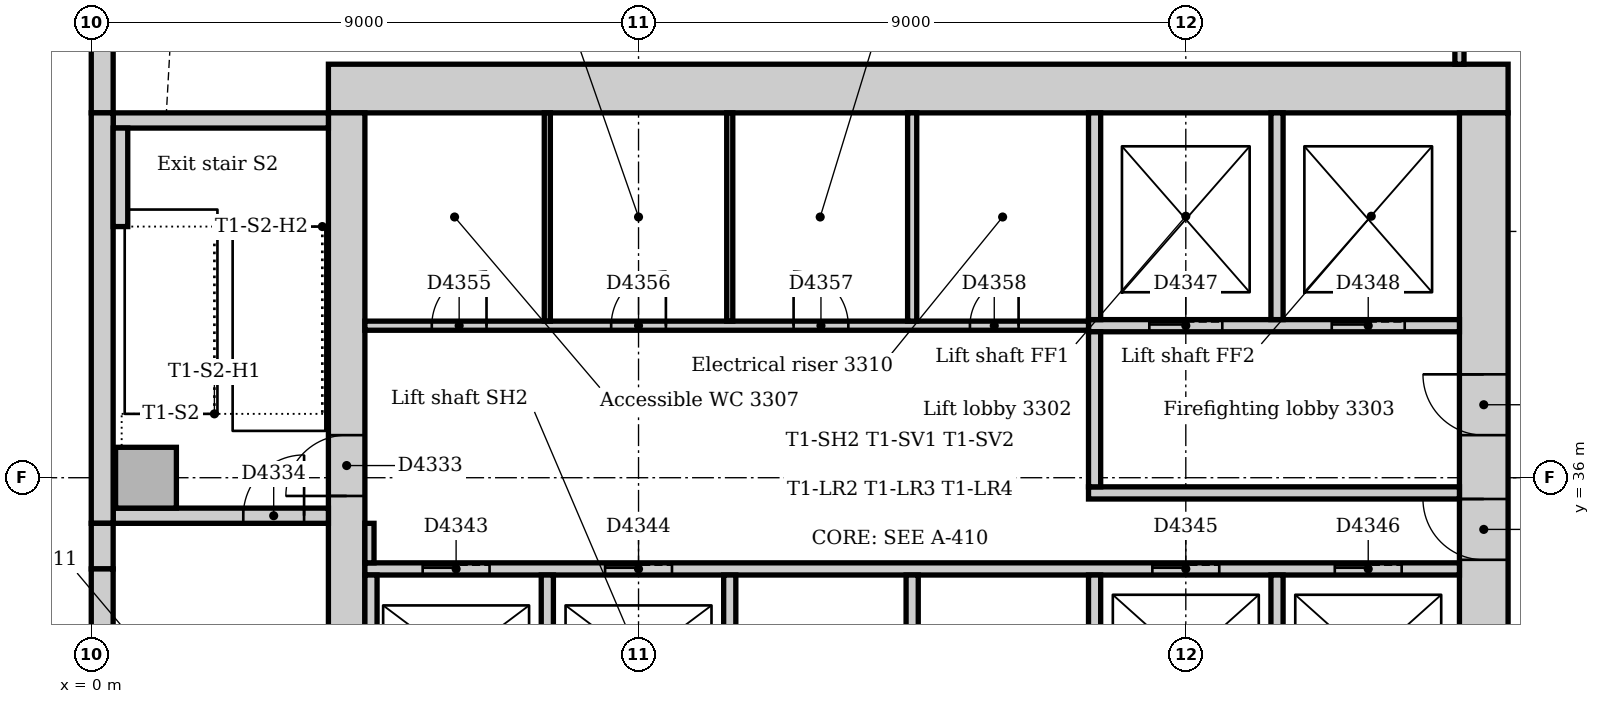
"""IFC4 building model, lengths in metres.
Left out: names, types, materials, properties, quantities, classifications, styles, units other than length and angle.
Written with IfcOpenShell. Run it as: python <this file> out.ifc"""

import sys

from ifc_helpers import new_model, si_unit, direction, frame, frame_2d, origin, origin_2d, place, context, subcontext, project, spatial, rectangle, extrude, element, fill, save


model = new_model("IFC4")
c1 = context("Model", 3, precision=1e-05, world=origin(), true_north=direction((0.0, 1.0)))
c2 = subcontext(c1, "Body", "Model", "MODEL_VIEW")
j1 = project(units=[si_unit("LENGTHUNIT", "METRE"), si_unit("PLANEANGLEUNIT", "RADIAN")], contexts=[c1])
p1 = place(None, origin())
s1 = spatial("IfcSite", under=j1, at=p1, CompositionType="ELEMENT")
p2 = place(p1, origin())
s2 = spatial("IfcBuilding", under=s1, at=p2, CompositionType="ELEMENT")
p3 = place(p2, frame((0.0, 0.0, 140.0)))
s3 = spatial("IfcBuildingStorey", under=s2, at=p3, CompositionType="ELEMENT", Elevation=140.0)
p4 = place(p3, frame((23.3, 42.4, 0.0), z_axis=(0.0, 0.0, 1.0), x_axis=(-1.0, 0.0, 0.0)))
e1 = element("IfcWall", 1, at=p4, inside=s3, PredefinedType="SOLIDWALL", context=c2, shape_type="SweptSolid", body=[
    extrude(rectangle(XDim=19.4, YDim=0.8, at=frame_2d((9.7, 0.0))), origin(), (0.0, 0.0, 1.0), 4.0),
])
p5 = place(p3, frame((22.9, 31.5, 0.0), z_axis=(0.0, 0.0, 1.0), x_axis=(0.0, 1.0, 0.0)))
e2 = element("IfcWall", 2, at=p5, inside=s3, PredefinedType="SOLIDWALL", context=c2, shape_type="SweptSolid", body=[
    extrude(rectangle(XDim=10.5, YDim=0.8, at=frame_2d((5.25, 0.0))), origin(), (0.0, 0.0, 1.0), 4.0),
])
p6 = place(p5, frame((3.15, 0.0, 0.0)))
e3 = element("IfcOpeningElement", 3, at=p6, cuts=e2, PredefinedType="OPENING", context=c2, shape_type="SweptSolid", body=[
    extrude(rectangle(XDim=1.0, YDim=2.1, at=frame_2d((0.5, 1.05))), frame((0.0, 0.41, 0.0), z_axis=(0.0, -1.0, 0.0), x_axis=(1.0, 0.0, 0.0)), (0.0, 0.0, 1.0), 0.82),
])
p7 = place(p5, frame((5.2, 0.0, 0.0)))
e4 = element("IfcOpeningElement", 4, at=p7, cuts=e2, PredefinedType="OPENING", context=c2, shape_type="SweptSolid", body=[
    extrude(rectangle(XDim=1.0, YDim=2.1, at=frame_2d((0.5, 1.05))), frame((0.0, 0.41, 0.0), z_axis=(0.0, -1.0, 0.0), x_axis=(1.0, 0.0, 0.0)), (0.0, 0.0, 1.0), 0.82),
])
p8 = place(p3, frame((4.2, 42.0, 0.0), z_axis=(0.0, 0.0, 1.0), x_axis=(0.0, -1.0, 0.0)))
e5 = element("IfcWall", 5, at=p8, inside=s3, PredefinedType="SOLIDWALL", context=c2, shape_type="SweptSolid", body=[
    extrude(rectangle(XDim=10.5, YDim=0.6, at=frame_2d((5.25, 0.0))), origin(), (0.0, 0.0, 1.0), 4.0),
])
p9 = place(p8, frame((5.3, 0.0, 0.0)))
e6 = element("IfcOpeningElement", 6, at=p9, cuts=e5, PredefinedType="OPENING", context=c2, shape_type="SweptSolid", body=[
    extrude(rectangle(XDim=1.0, YDim=2.1, at=frame_2d((0.5, 1.05))), frame((0.0, 0.31, 0.0), z_axis=(0.0, -1.0, 0.0), x_axis=(1.0, 0.0, 0.0)), (0.0, 0.0, 1.0), 0.62),
])
p10 = place(p3, frame((0.36, 35.375, 0.0), z_axis=(0.0, 0.0, 1.0), x_axis=(1.0, 0.0, 0.0)))
e7 = element("IfcWall", 7, at=p10, inside=s3, PredefinedType="SOLIDWALL", context=c2, shape_type="SweptSolid", body=[
    extrude(rectangle(XDim=3.54, YDim=0.25, at=frame_2d((1.77, 0.0))), origin(), (0.0, 0.0, 1.0), 4.0),
])
p11 = place(p10, frame((2.14, 0.0, 0.0)))
e8 = element("IfcOpeningElement", 8, at=p11, cuts=e7, PredefinedType="OPENING", context=c2, shape_type="SweptSolid", body=[
    extrude(rectangle(XDim=1.0, YDim=2.1, at=frame_2d((0.5, 1.05))), frame((0.0, 0.135, 0.0), z_axis=(0.0, -1.0, 0.0), x_axis=(1.0, 0.0, 0.0)), (0.0, 0.0, 1.0), 0.27),
])
p12 = place(p3, frame((3.9, 41.875, 0.0), z_axis=(0.0, 0.0, 1.0), x_axis=(-1.0, 0.0, 0.0)))
e9 = element("IfcWall", 9, at=p12, inside=s3, PredefinedType="SOLIDWALL", context=c2, shape_type="SweptSolid", body=[
    extrude(rectangle(XDim=3.54, YDim=0.25, at=frame_2d((1.77, 0.0))), origin(), (0.0, 0.0, 1.0), 4.0),
])
p13 = place(p3, frame((0.9, 36.0, 0.0), z_axis=(0.0, 0.0, 1.0), x_axis=(1.0, 0.0, 0.0)))
e10 = element("IfcColumn", 10, at=p13, inside=s3, PredefinedType="COLUMN", context=c2, shape_type="SweptSolid", body=[
    extrude(rectangle(XDim=1.0, YDim=1.0, at=origin_2d()), origin(), (0.0, 0.0, 1.0), 4.0),
])
p14 = place(p3, frame((0.18, 45.257, 0.0), z_axis=(0.0, 0.0, 1.0), x_axis=(0.0, -1.0, 0.0)))
e11 = element("IfcWall", 11, at=p14, inside=s3, PredefinedType="STANDARD", context=c2, shape_type="SweptSolid", body=[
    extrude(rectangle(XDim=3.257, YDim=0.36, at=frame_2d((1.629, 0.0))), origin(), (0.0, 0.0, 1.0), 3.7),
])
p15 = place(p3, frame((0.18, 42.0, 0.0), z_axis=(0.0, 0.0, 1.0), x_axis=(0.0, -1.0, 0.0)))
e12 = element("IfcWall", 12, at=p15, inside=s3, PredefinedType="STANDARD", context=c2, shape_type="SweptSolid", body=[
    extrude(rectangle(XDim=6.75, YDim=0.36, at=frame_2d((3.375, 0.0))), origin(), (0.0, 0.0, 1.0), 3.7),
])
p16 = place(p3, frame((0.18, 35.25, 0.0), z_axis=(0.0, 0.0, 1.0), x_axis=(0.0, -1.0, 0.0)))
e13 = element("IfcWall", 13, at=p16, inside=s3, PredefinedType="STANDARD", context=c2, shape_type="SweptSolid", body=[
    extrude(rectangle(XDim=0.75, YDim=0.36, at=frame_2d((0.375, 0.0))), origin(), (0.0, 0.0, 1.0), 3.7),
])
p17 = place(p3, frame((0.18, 34.5, 0.0), z_axis=(0.0, 0.0, 1.0), x_axis=(0.0, -1.0, 0.0)))
e14 = element("IfcWall", 14, at=p17, inside=s3, PredefinedType="STANDARD", context=c2, shape_type="SweptSolid", body=[
    extrude(rectangle(XDim=6.0, YDim=0.36, at=frame_2d((3.0, 0.0))), origin(), (0.0, 0.0, 1.0), 3.7),
])
p18 = place(p17, frame((2.1, 0.0, 0.0)))
e15 = element("IfcOpeningElement", 15, at=p18, cuts=e14, PredefinedType="OPENING", context=c2, shape_type="SweptSolid", body=[
    extrude(rectangle(XDim=1.8, YDim=2.4, at=frame_2d((0.9, 1.2))), frame((0.0, 0.19, 0.0), z_axis=(0.0, -1.0, 0.0), x_axis=(1.0, 0.0, 0.0)), (0.0, 0.0, 1.0), 0.38),
])
p19 = place(p3, frame((0.48, 40.13, 0.0), z_axis=(0.0, 0.0, 1.0), x_axis=(0.0, 1.0, 0.0)))
e16 = element("IfcWall", 16, at=p19, inside=s3, PredefinedType="STANDARD", context=c2, shape_type="SweptSolid", body=[
    extrude(rectangle(XDim=1.62, YDim=0.24, at=frame_2d((0.81, 0.0))), origin(), (0.0, 0.0, 1.0), 4.0),
])
p20 = place(p3, frame((16.4, 35.75, 0.0), z_axis=(0.0, 0.0, 1.0), x_axis=(1.0, 0.0, 0.0)))
e17 = element("IfcWall", 17, at=p20, inside=s3, PredefinedType="PARTITIONING", context=c2, shape_type="SweptSolid", body=[
    extrude(rectangle(XDim=6.1, YDim=0.2, at=frame_2d((3.05, 0.0))), origin(), (0.0, 0.0, 1.0), 3.7),
])
p21 = place(p3, frame((16.4, 38.5, 0.0), z_axis=(0.0, 0.0, 1.0), x_axis=(1.0, 0.0, 0.0)))
e18 = element("IfcWall", 18, at=p21, inside=s3, PredefinedType="PARTITIONING", context=c2, shape_type="SweptSolid", body=[
    extrude(rectangle(XDim=6.1, YDim=0.2, at=frame_2d((3.05, 0.0))), origin(), (0.0, 0.0, 1.0), 3.7),
])
p22 = place(p21, frame((1.0, 0.0, 0.0)))
e19 = element("IfcOpeningElement", 19, at=p22, cuts=e18, PredefinedType="OPENING", context=c2, shape_type="SweptSolid", body=[
    extrude(rectangle(XDim=1.2, YDim=2.1, at=frame_2d((0.6, 1.05))), frame((0.0, 0.11, 0.0), z_axis=(0.0, -1.0, 0.0), x_axis=(1.0, 0.0, 0.0)), (0.0, 0.0, 1.0), 0.22),
])
p23 = place(p21, frame((4.0, 0.0, 0.0)))
e20 = element("IfcOpeningElement", 20, at=p23, cuts=e18, PredefinedType="OPENING", context=c2, shape_type="SweptSolid", body=[
    extrude(rectangle(XDim=1.2, YDim=2.1, at=frame_2d((0.6, 1.05))), frame((0.0, 0.11, 0.0), z_axis=(0.0, -1.0, 0.0), x_axis=(1.0, 0.0, 0.0)), (0.0, 0.0, 1.0), 0.22),
])
p24 = place(p3, frame((16.5, 35.85, 0.0), z_axis=(0.0, 0.0, 1.0), x_axis=(0.0, 1.0, 0.0)))
e21 = element("IfcWall", 21, at=p24, inside=s3, PredefinedType="PARTITIONING", context=c2, shape_type="SweptSolid", body=[
    extrude(rectangle(XDim=2.55, YDim=0.2, at=frame_2d((1.275, 0.0))), origin(), (0.0, 0.0, 1.0), 3.7),
])
p25 = place(p3, frame((4.5, 34.5, 0.0), z_axis=(0.0, 0.0, 1.0), x_axis=(1.0, 0.0, 0.0)))
e22 = element("IfcWall", 22, at=p25, inside=s3, PredefinedType="PARTITIONING", context=c2, shape_type="SweptSolid", body=[
    extrude(rectangle(XDim=18.0, YDim=0.2, at=frame_2d((9.0, 0.0))), origin(), (0.0, 0.0, 1.0), 3.7),
])
p26 = place(p25, frame((0.95, 0.0, 0.0)))
e23 = element("IfcOpeningElement", 23, at=p26, cuts=e22, PredefinedType="OPENING", context=c2, shape_type="SweptSolid", body=[
    extrude(rectangle(XDim=1.1, YDim=2.1, at=frame_2d((0.55, 1.05))), frame((0.0, 0.11, 0.0), z_axis=(0.0, -1.0, 0.0), x_axis=(1.0, 0.0, 0.0)), (0.0, 0.0, 1.0), 0.22),
])
p27 = place(p25, frame((3.95, 0.0, 0.0)))
e24 = element("IfcOpeningElement", 24, at=p27, cuts=e22, PredefinedType="OPENING", context=c2, shape_type="SweptSolid", body=[
    extrude(rectangle(XDim=1.1, YDim=2.1, at=frame_2d((0.55, 1.05))), frame((0.0, 0.11, 0.0), z_axis=(0.0, -1.0, 0.0), x_axis=(1.0, 0.0, 0.0)), (0.0, 0.0, 1.0), 0.22),
])
p28 = place(p25, frame((12.95, 0.0, 0.0)))
e25 = element("IfcOpeningElement", 25, at=p28, cuts=e22, PredefinedType="OPENING", context=c2, shape_type="SweptSolid", body=[
    extrude(rectangle(XDim=1.1, YDim=2.1, at=frame_2d((0.55, 1.05))), frame((0.0, 0.11, 0.0), z_axis=(0.0, -1.0, 0.0), x_axis=(1.0, 0.0, 0.0)), (0.0, 0.0, 1.0), 0.22),
])
p29 = place(p25, frame((15.95, 0.0, 0.0)))
e26 = element("IfcOpeningElement", 26, at=p29, cuts=e22, PredefinedType="OPENING", context=c2, shape_type="SweptSolid", body=[
    extrude(rectangle(XDim=1.1, YDim=2.1, at=frame_2d((0.55, 1.05))), frame((0.0, 0.11, 0.0), z_axis=(0.0, -1.0, 0.0), x_axis=(1.0, 0.0, 0.0)), (0.0, 0.0, 1.0), 0.22),
])
for number, where, z_axis, x_axis in (
    (27, (16.5, 38.6, 0.0), (0.0, 0.0, 1.0), (0.0, 1.0, 0.0)),
    (28, (19.5, 38.6, 0.0), (0.0, 0.0, 1.0), (0.0, 1.0, 0.0)),
):
    element("IfcWall", number, at=place(p3, frame(where, z_axis=z_axis, x_axis=x_axis)), inside=s3, PredefinedType="PARTITIONING", context=c2, shape_type="SweptSolid", body=[
        extrude(rectangle(XDim=3.4, YDim=0.2, at=frame_2d((1.7, 0.0))), origin(), (0.0, 0.0, 1.0), 3.7),
    ])
for number, where, z_axis, x_axis in (
    (29, (4.6, 31.75, 0.0), (0.0, 0.0, 1.0), (0.0, 1.0, 0.0)),
    (30, (7.5, 31.75, 0.0), (0.0, 0.0, 1.0), (0.0, 1.0, 0.0)),
    (31, (10.5, 31.75, 0.0), (0.0, 0.0, 1.0), (0.0, 1.0, 0.0)),
    (32, (13.5, 31.75, 0.0), (0.0, 0.0, 1.0), (0.0, 1.0, 0.0)),
    (33, (16.5, 31.75, 0.0), (0.0, 0.0, 1.0), (0.0, 1.0, 0.0)),
    (34, (19.5, 31.75, 0.0), (0.0, 0.0, 1.0), (0.0, 1.0, 0.0)),
):
    element("IfcWall", number, at=place(p3, frame(where, z_axis=z_axis, x_axis=x_axis)), inside=s3, PredefinedType="PARTITIONING", context=c2, shape_type="SweptSolid", body=[
        extrude(rectangle(XDim=2.65, YDim=0.2, at=frame_2d((1.325, 0.0))), origin(), (0.0, 0.0, 1.0), 3.7),
    ])
p30 = place(p3, frame((4.5, 38.5, 0.0), z_axis=(0.0, 0.0, 1.0), x_axis=(1.0, 0.0, 0.0)))
e35 = element("IfcWall", 35, at=p30, inside=s3, PredefinedType="PARTITIONING", context=c2, shape_type="SweptSolid", body=[
    extrude(rectangle(XDim=11.9, YDim=0.15, at=frame_2d((5.95, 0.0))), origin(), (0.0, 0.0, 1.0), 3.7),
])
p31 = place(p30, frame((1.1, 0.0, 0.0)))
e36 = element("IfcOpeningElement", 36, at=p31, cuts=e35, PredefinedType="OPENING", context=c2, shape_type="SweptSolid", body=[
    extrude(rectangle(XDim=0.9, YDim=2.1, at=frame_2d((0.45, 1.05))), frame((0.0, 0.085, 0.0), z_axis=(0.0, -1.0, 0.0), x_axis=(1.0, 0.0, 0.0)), (0.0, 0.0, 1.0), 0.17),
])
p32 = place(p30, frame((4.05, 0.0, 0.0)))
e37 = element("IfcOpeningElement", 37, at=p32, cuts=e35, PredefinedType="OPENING", context=c2, shape_type="SweptSolid", body=[
    extrude(rectangle(XDim=0.9, YDim=2.1, at=frame_2d((0.45, 1.05))), frame((0.0, 0.085, 0.0), z_axis=(0.0, -1.0, 0.0), x_axis=(1.0, 0.0, 0.0)), (0.0, 0.0, 1.0), 0.17),
])
p33 = place(p30, frame((7.05, 0.0, 0.0)))
e38 = element("IfcOpeningElement", 38, at=p33, cuts=e35, PredefinedType="OPENING", context=c2, shape_type="SweptSolid", body=[
    extrude(rectangle(XDim=0.9, YDim=2.1, at=frame_2d((0.45, 1.05))), frame((0.0, 0.085, 0.0), z_axis=(0.0, -1.0, 0.0), x_axis=(1.0, 0.0, 0.0)), (0.0, 0.0, 1.0), 0.17),
])
p34 = place(p30, frame((9.95, 0.0, 0.0)))
e39 = element("IfcOpeningElement", 39, at=p34, cuts=e35, PredefinedType="OPENING", context=c2, shape_type="SweptSolid", body=[
    extrude(rectangle(XDim=0.8, YDim=2.1, at=frame_2d((0.4, 1.05))), frame((0.0, 0.085, 0.0), z_axis=(0.0, -1.0, 0.0), x_axis=(1.0, 0.0, 0.0)), (0.0, 0.0, 1.0), 0.17),
])
p35 = place(p3, frame((22.5, 42.8, 0.0), z_axis=(0.0, 0.0, 1.0), x_axis=(0.0, 1.0, 0.0)))
e40 = element("IfcWall", 40, at=p35, inside=s3, PredefinedType="PARTITIONING", context=c2, shape_type="SweptSolid", body=[
    extrude(rectangle(XDim=1.725, YDim=0.15, at=frame_2d((0.863, 0.0))), origin(), (0.0, 0.0, 1.0), 3.7),
])
p36 = place(p3, frame((4.575, 34.6, 0.0), z_axis=(0.0, 0.0, 1.0), x_axis=(0.0, 1.0, 0.0)))
e41 = element("IfcWall", 41, at=p36, inside=s3, PredefinedType="PARTITIONING", context=c2, shape_type="SweptSolid", body=[
    extrude(rectangle(XDim=0.65, YDim=0.15, at=frame_2d((0.325, 0.0))), origin(), (0.0, 0.0, 1.0), 3.7),
])
p37 = place(p3, frame((13.5, 38.575, 0.0), z_axis=(0.0, 0.0, 1.0), x_axis=(0.0, 1.0, 0.0)))
e42 = element("IfcWall", 42, at=p37, inside=s3, PredefinedType="PARTITIONING", context=c2, shape_type="SweptSolid", body=[
    extrude(rectangle(XDim=3.425, YDim=0.15, at=frame_2d((1.712, 0.0))), origin(), (0.0, 0.0, 1.0), 3.7),
])
for number, where, z_axis, x_axis in (
    (43, (7.5, 38.575, 0.0), (0.0, 0.0, 1.0), (0.0, 1.0, 0.0)),
    (44, (10.5, 38.575, 0.0), (0.0, 0.0, 1.0), (0.0, 1.0, 0.0)),
):
    element("IfcWall", number, at=place(p3, frame(where, z_axis=z_axis, x_axis=x_axis)), inside=s3, PredefinedType="PARTITIONING", context=c2, shape_type="SweptSolid", body=[
        extrude(rectangle(XDim=3.425, YDim=0.1, at=frame_2d((1.712, 0.0))), origin(), (0.0, 0.0, 1.0), 3.7),
    ])
p38 = place(p9, frame((1.0, 0.0, 0.0), z_axis=(0.0, 0.0, 1.0), x_axis=(-1.0, 0.0, 0.0)))
e45 = element("IfcDoor", 45, at=p38, inside=s3, OperationType="SINGLE_SWING_LEFT", PredefinedType="DOOR", context=c2, shape_type="SweptSolid", body=[
    extrude(rectangle(XDim=1.0, YDim=2.1, at=frame_2d((0.5, 1.05))), frame((0.0, 0.025, 0.0), z_axis=(0.0, -1.0, 0.0), x_axis=(1.0, 0.0, 0.0)), (0.0, 0.0, 1.0), 0.05),
])
fill(e6, e45)
p39 = place(p11, origin())
e46 = element("IfcDoor", 46, at=p39, inside=s3, OperationType="SINGLE_SWING_RIGHT", PredefinedType="DOOR", context=c2, shape_type="SweptSolid", body=[
    extrude(rectangle(XDim=1.0, YDim=2.1, at=frame_2d((0.5, 1.05))), frame((0.0, 0.025, 0.0), z_axis=(0.0, -1.0, 0.0), x_axis=(1.0, 0.0, 0.0)), (0.0, 0.0, 1.0), 0.05),
])
fill(e8, e46)
p40 = place(p26, origin())
e47 = element("IfcDoor", 47, at=p40, inside=s3, OperationType="SLIDING_TO_LEFT", PredefinedType="DOOR", context=c2, shape_type="SweptSolid", body=[
    extrude(rectangle(XDim=1.1, YDim=2.1, at=frame_2d((0.55, 1.05))), frame((0.0, 0.025, 0.0), z_axis=(0.0, -1.0, 0.0), x_axis=(1.0, 0.0, 0.0)), (0.0, 0.0, 1.0), 0.05),
])
fill(e23, e47)
p41 = place(p27, origin())
e48 = element("IfcDoor", 48, at=p41, inside=s3, OperationType="SLIDING_TO_LEFT", PredefinedType="DOOR", context=c2, shape_type="SweptSolid", body=[
    extrude(rectangle(XDim=1.1, YDim=2.1, at=frame_2d((0.55, 1.05))), frame((0.0, 0.025, 0.0), z_axis=(0.0, -1.0, 0.0), x_axis=(1.0, 0.0, 0.0)), (0.0, 0.0, 1.0), 0.05),
])
fill(e24, e48)
p42 = place(p28, origin())
e49 = element("IfcDoor", 49, at=p42, inside=s3, OperationType="SLIDING_TO_LEFT", PredefinedType="DOOR", context=c2, shape_type="SweptSolid", body=[
    extrude(rectangle(XDim=1.1, YDim=2.1, at=frame_2d((0.55, 1.05))), frame((0.0, 0.025, 0.0), z_axis=(0.0, -1.0, 0.0), x_axis=(1.0, 0.0, 0.0)), (0.0, 0.0, 1.0), 0.05),
])
fill(e25, e49)
p43 = place(p29, origin())
e50 = element("IfcDoor", 50, at=p43, inside=s3, OperationType="SLIDING_TO_LEFT", PredefinedType="DOOR", context=c2, shape_type="SweptSolid", body=[
    extrude(rectangle(XDim=1.1, YDim=2.1, at=frame_2d((0.55, 1.05))), frame((0.0, 0.025, 0.0), z_axis=(0.0, -1.0, 0.0), x_axis=(1.0, 0.0, 0.0)), (0.0, 0.0, 1.0), 0.05),
])
fill(e26, e50)
p44 = place(p22, origin())
e51 = element("IfcDoor", 51, at=p44, inside=s3, OperationType="SLIDING_TO_LEFT", PredefinedType="DOOR", context=c2, shape_type="SweptSolid", body=[
    extrude(rectangle(XDim=1.2, YDim=2.1, at=frame_2d((0.6, 1.05))), frame((0.0, 0.025, 0.0), z_axis=(0.0, -1.0, 0.0), x_axis=(1.0, 0.0, 0.0)), (0.0, 0.0, 1.0), 0.05),
])
fill(e19, e51)
p45 = place(p23, origin())
e52 = element("IfcDoor", 52, at=p45, inside=s3, OperationType="SLIDING_TO_LEFT", PredefinedType="DOOR", context=c2, shape_type="SweptSolid", body=[
    extrude(rectangle(XDim=1.2, YDim=2.1, at=frame_2d((0.6, 1.05))), frame((0.0, 0.025, 0.0), z_axis=(0.0, -1.0, 0.0), x_axis=(1.0, 0.0, 0.0)), (0.0, 0.0, 1.0), 0.05),
])
fill(e20, e52)
p46 = place(p6, origin())
e53 = element("IfcDoor", 53, at=p46, inside=s3, OperationType="SINGLE_SWING_RIGHT", PredefinedType="DOOR", context=c2, shape_type="SweptSolid", body=[
    extrude(rectangle(XDim=1.0, YDim=2.1, at=frame_2d((0.5, 1.05))), frame((0.0, 0.025, 0.0), z_axis=(0.0, -1.0, 0.0), x_axis=(1.0, 0.0, 0.0)), (0.0, 0.0, 1.0), 0.05),
])
fill(e3, e53)
p47 = place(p7, origin())
e54 = element("IfcDoor", 54, at=p47, inside=s3, OperationType="SINGLE_SWING_RIGHT", PredefinedType="DOOR", context=c2, shape_type="SweptSolid", body=[
    extrude(rectangle(XDim=1.0, YDim=2.1, at=frame_2d((0.5, 1.05))), frame((0.0, 0.025, 0.0), z_axis=(0.0, -1.0, 0.0), x_axis=(1.0, 0.0, 0.0)), (0.0, 0.0, 1.0), 0.05),
])
fill(e4, e54)
p48 = place(p31, origin())
e55 = element("IfcDoor", 55, at=p48, inside=s3, OperationType="SINGLE_SWING_RIGHT", PredefinedType="DOOR", context=c2, shape_type="SweptSolid", body=[
    extrude(rectangle(XDim=0.9, YDim=2.1, at=frame_2d((0.45, 1.05))), frame((0.0, 0.025, 0.0), z_axis=(0.0, -1.0, 0.0), x_axis=(1.0, 0.0, 0.0)), (0.0, 0.0, 1.0), 0.05),
])
fill(e36, e55)
p49 = place(p32, origin())
e56 = element("IfcDoor", 56, at=p49, inside=s3, OperationType="SINGLE_SWING_RIGHT", PredefinedType="DOOR", context=c2, shape_type="SweptSolid", body=[
    extrude(rectangle(XDim=0.9, YDim=2.1, at=frame_2d((0.45, 1.05))), frame((0.0, 0.025, 0.0), z_axis=(0.0, -1.0, 0.0), x_axis=(1.0, 0.0, 0.0)), (0.0, 0.0, 1.0), 0.05),
])
fill(e37, e56)
p50 = place(p33, origin())
e57 = element("IfcDoor", 57, at=p50, inside=s3, OperationType="SINGLE_SWING_LEFT", PredefinedType="DOOR", context=c2, shape_type="SweptSolid", body=[
    extrude(rectangle(XDim=0.9, YDim=2.1, at=frame_2d((0.45, 1.05))), frame((0.0, 0.025, 0.0), z_axis=(0.0, -1.0, 0.0), x_axis=(1.0, 0.0, 0.0)), (0.0, 0.0, 1.0), 0.05),
])
fill(e38, e57)
p51 = place(p34, origin())
e58 = element("IfcDoor", 58, at=p51, inside=s3, OperationType="SINGLE_SWING_RIGHT", PredefinedType="DOOR", context=c2, shape_type="SweptSolid", body=[
    extrude(rectangle(XDim=0.8, YDim=2.1, at=frame_2d((0.4, 1.05))), frame((0.0, 0.025, 0.0), z_axis=(0.0, -1.0, 0.0), x_axis=(1.0, 0.0, 0.0)), (0.0, 0.0, 1.0), 0.05),
])
fill(e39, e58)
save(model, sys.argv[1])
